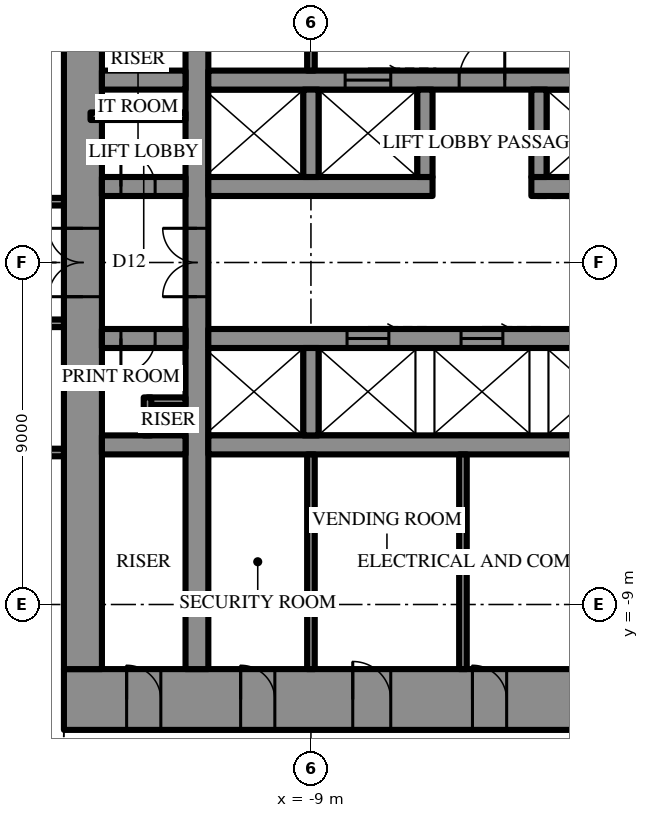
"""IFC4 building model, lengths in metres.
Left out: names, types, materials, properties, quantities, classifications, styles, units other than length and angle.
Written with IfcOpenShell. Run it as: python <this file> out.ifc"""

import sys

from ifc_helpers import new_model, si_unit, direction, frame, frame_2d, origin, place, context, subcontext, project, spatial, rectangle, extrude, element, fill, save


model = new_model("IFC4")
c1 = context("Model", 3, precision=1e-05, world=origin(), true_north=direction((0.0, 1.0)))
c2 = subcontext(c1, "Body", "Model", "MODEL_VIEW")
j1 = project(units=[si_unit("LENGTHUNIT", "METRE"), si_unit("PLANEANGLEUNIT", "RADIAN")], contexts=[c1])
p1 = place(None, origin())
s1 = spatial("IfcSite", under=j1, at=p1, CompositionType="ELEMENT")
p2 = place(p1, origin())
s2 = spatial("IfcBuilding", under=s1, at=p2, CompositionType="ELEMENT")
p3 = place(p2, frame((0.0, 0.0, 286.9)))
s3 = spatial("IfcBuildingStorey", under=s2, at=p3, CompositionType="ELEMENT", Elevation=286.9)
p4 = place(p3, frame((15.5, -11.5, 0.0), z_axis=(0.0, 0.0, 1.0), x_axis=(-1.0, 0.0, 0.0)))
e1 = element("IfcWall", 1, at=p4, inside=s3, PredefinedType="SHEAR", context=c2, shape_type="SweptSolid", body=[
    extrude(rectangle(XDim=31.0, YDim=1.6, at=frame_2d((15.5, 0.0))), origin(), (0.0, 0.0, 1.0), 4.2),
])
p5 = place(p4, frame((16.35, 0.0, 0.0)))
e2 = element("IfcOpeningElement", 2, at=p5, cuts=e1, PredefinedType="OPENING", context=c2, shape_type="SweptSolid", body=[
    extrude(rectangle(XDim=0.9, YDim=2.2, at=frame_2d((0.45, 1.1))), frame((0.0, 0.81, 0.0), z_axis=(0.0, -1.0, 0.0), x_axis=(1.0, 0.0, 0.0)), (0.0, 0.0, 1.0), 1.62),
])
p6 = place(p4, frame((19.35, 0.0, 0.0)))
e3 = element("IfcOpeningElement", 3, at=p6, cuts=e1, PredefinedType="OPENING", context=c2, shape_type="SweptSolid", body=[
    extrude(rectangle(XDim=0.9, YDim=2.2, at=frame_2d((0.45, 1.1))), frame((0.0, 0.81, 0.0), z_axis=(0.0, -1.0, 0.0), x_axis=(1.0, 0.0, 0.0)), (0.0, 0.0, 1.0), 1.62),
])
p7 = place(p4, frame((22.4, 0.0, 0.0)))
e4 = element("IfcOpeningElement", 4, at=p7, cuts=e1, PredefinedType="OPENING", context=c2, shape_type="SweptSolid", body=[
    extrude(rectangle(XDim=1.0, YDim=2.2, at=frame_2d((0.5, 1.1))), frame((0.0, 0.81, 0.0), z_axis=(0.0, -1.0, 0.0), x_axis=(1.0, 0.0, 0.0)), (0.0, 0.0, 1.0), 1.62),
])
p8 = place(p4, frame((1.65, 0.0, 0.0)))
e5 = element("IfcOpeningElement", 5, at=p8, cuts=e1, PredefinedType="OPENING", context=c2, shape_type="SweptSolid", body=[
    extrude(rectangle(XDim=0.9, YDim=2.2, at=frame_2d((0.45, 1.1))), frame((0.0, 0.81, 0.0), z_axis=(0.0, -1.0, 0.0), x_axis=(1.0, 0.0, 0.0)), (0.0, 0.0, 1.0), 1.62),
])
p9 = place(p4, frame((4.65, 0.0, 0.0)))
e6 = element("IfcOpeningElement", 6, at=p9, cuts=e1, PredefinedType="OPENING", context=c2, shape_type="SweptSolid", body=[
    extrude(rectangle(XDim=0.9, YDim=2.2, at=frame_2d((0.45, 1.1))), frame((0.0, 0.81, 0.0), z_axis=(0.0, -1.0, 0.0), x_axis=(1.0, 0.0, 0.0)), (0.0, 0.0, 1.0), 1.62),
])
p10 = place(p4, frame((25.45, 0.0, 0.0)))
e7 = element("IfcOpeningElement", 7, at=p10, cuts=e1, PredefinedType="OPENING", context=c2, shape_type="SweptSolid", body=[
    extrude(rectangle(XDim=0.9, YDim=2.2, at=frame_2d((0.45, 1.1))), frame((0.0, 0.81, 0.0), z_axis=(0.0, -1.0, 0.0), x_axis=(1.0, 0.0, 0.0)), (0.0, 0.0, 1.0), 1.62),
])
p11 = place(p4, frame((28.45, 0.0, 0.0)))
e8 = element("IfcOpeningElement", 8, at=p11, cuts=e1, PredefinedType="OPENING", context=c2, shape_type="SweptSolid", body=[
    extrude(rectangle(XDim=0.9, YDim=2.2, at=frame_2d((0.45, 1.1))), frame((0.0, 0.81, 0.0), z_axis=(0.0, -1.0, 0.0), x_axis=(1.0, 0.0, 0.0)), (0.0, 0.0, 1.0), 1.62),
])
p12 = place(p3, frame((-15.0, 10.7, 0.0), z_axis=(0.0, 0.0, 1.0), x_axis=(0.0, -1.0, 0.0)))
e9 = element("IfcWall", 9, at=p12, inside=s3, PredefinedType="SHEAR", context=c2, shape_type="SweptSolid", body=[
    extrude(rectangle(XDim=21.4, YDim=1.0, at=frame_2d((10.7, 0.0))), origin(), (0.0, 0.0, 1.0), 4.2),
])
p13 = place(p12, frame((9.8, 0.0, 0.0)))
e10 = element("IfcOpeningElement", 10, at=p13, cuts=e9, PredefinedType="OPENING", context=c2, shape_type="SweptSolid", body=[
    extrude(rectangle(XDim=1.8, YDim=2.4, at=frame_2d((0.9, 1.2))), frame((0.0, 0.51, 0.0), z_axis=(0.0, -1.0, 0.0), x_axis=(1.0, 0.0, 0.0)), (0.0, 0.0, 1.0), 1.02),
])
p14 = place(p3, frame((-12.0, -10.7, 0.0), z_axis=(0.0, 0.0, 1.0), x_axis=(0.0, 1.0, 0.0)))
e11 = element("IfcWall", 11, at=p14, inside=s3, PredefinedType="SHEAR", context=c2, shape_type="SweptSolid", body=[
    extrude(rectangle(XDim=21.4, YDim=0.6, at=frame_2d((10.7, 0.0))), origin(), (0.0, 0.0, 1.0), 4.2),
])
p15 = place(p14, frame((9.8, 0.0, 0.0)))
e12 = element("IfcOpeningElement", 12, at=p15, cuts=e11, PredefinedType="OPENING", context=c2, shape_type="SweptSolid", body=[
    extrude(rectangle(XDim=1.8, YDim=2.4, at=frame_2d((0.9, 1.2))), frame((0.0, 0.31, 0.0), z_axis=(0.0, -1.0, 0.0), x_axis=(1.0, 0.0, 0.0)), (0.0, 0.0, 1.0), 0.62),
])
p16 = place(p3, frame((-14.5, 2.0, 0.0), z_axis=(0.0, 0.0, 1.0), x_axis=(1.0, 0.0, 0.0)))
e13 = element("IfcWall", 13, at=p16, inside=s3, PredefinedType="SHEAR", context=c2, shape_type="SweptSolid", body=[
    extrude(rectangle(XDim=2.2, YDim=0.5, at=frame_2d((1.1, 0.0))), origin(), (0.0, 0.0, 1.0), 4.2),
])
p17 = place(p16, frame((0.5, 0.0, 0.0)))
e14 = element("IfcOpeningElement", 14, at=p17, cuts=e13, PredefinedType="OPENING", context=c2, shape_type="SweptSolid", body=[
    extrude(rectangle(XDim=0.9, YDim=2.2, at=frame_2d((0.45, 1.1))), frame((0.0, 0.26, 0.0), z_axis=(0.0, -1.0, 0.0), x_axis=(1.0, 0.0, 0.0)), (0.0, 0.0, 1.0), 0.52),
])
p18 = place(p3, frame((-11.7, 2.0, 0.0), z_axis=(0.0, 0.0, 1.0), x_axis=(1.0, 0.0, 0.0)))
e15 = element("IfcWall", 15, at=p18, inside=s3, PredefinedType="SHEAR", context=c2, shape_type="SweptSolid", body=[
    extrude(rectangle(XDim=5.9, YDim=0.5, at=frame_2d((2.95, 0.0))), origin(), (0.0, 0.0, 1.0), 4.2),
])
p19 = place(p3, frame((-3.2, 2.0, 0.0), z_axis=(0.0, 0.0, 1.0), x_axis=(1.0, 0.0, 0.0)))
e16 = element("IfcWall", 16, at=p19, inside=s3, PredefinedType="SHEAR", context=c2, shape_type="SweptSolid", body=[
    extrude(rectangle(XDim=14.9, YDim=0.5, at=frame_2d((7.45, 0.0))), origin(), (0.0, 0.0, 1.0), 4.2),
])
p20 = place(p19, frame((1.15, 0.0, 0.0)))
e17 = element("IfcOpeningElement", 17, at=p20, cuts=e16, PredefinedType="OPENING", context=c2, shape_type="SweptSolid", body=[
    extrude(rectangle(XDim=1.1, YDim=2.2, at=frame_2d((0.55, 1.1))), frame((0.0, 0.26, 0.0), z_axis=(0.0, -1.0, 0.0), x_axis=(1.0, 0.0, 0.0)), (0.0, 0.0, 1.0), 0.52),
])
p21 = place(p19, frame((4.15, 0.0, 0.0)))
e18 = element("IfcOpeningElement", 18, at=p21, cuts=e16, PredefinedType="OPENING", context=c2, shape_type="SweptSolid", body=[
    extrude(rectangle(XDim=1.1, YDim=2.2, at=frame_2d((0.55, 1.1))), frame((0.0, 0.26, 0.0), z_axis=(0.0, -1.0, 0.0), x_axis=(1.0, 0.0, 0.0)), (0.0, 0.0, 1.0), 0.52),
])
p22 = place(p19, frame((7.15, 0.0, 0.0)))
e19 = element("IfcOpeningElement", 19, at=p22, cuts=e16, PredefinedType="OPENING", context=c2, shape_type="SweptSolid", body=[
    extrude(rectangle(XDim=1.1, YDim=2.2, at=frame_2d((0.55, 1.1))), frame((0.0, 0.26, 0.0), z_axis=(0.0, -1.0, 0.0), x_axis=(1.0, 0.0, 0.0)), (0.0, 0.0, 1.0), 0.52),
])
p23 = place(p19, frame((10.15, 0.0, 0.0)))
e20 = element("IfcOpeningElement", 20, at=p23, cuts=e16, PredefinedType="OPENING", context=c2, shape_type="SweptSolid", body=[
    extrude(rectangle(XDim=1.1, YDim=2.2, at=frame_2d((0.55, 1.1))), frame((0.0, 0.26, 0.0), z_axis=(0.0, -1.0, 0.0), x_axis=(1.0, 0.0, 0.0)), (0.0, 0.0, 1.0), 0.52),
])
p24 = place(p3, frame((-14.5, 4.8, 0.0), z_axis=(0.0, 0.0, 1.0), x_axis=(1.0, 0.0, 0.0)))
e21 = element("IfcWall", 21, at=p24, inside=s3, PredefinedType="SHEAR", context=c2, shape_type="SweptSolid", body=[
    extrude(rectangle(XDim=2.2, YDim=0.5, at=frame_2d((1.1, 0.0))), origin(), (0.0, 0.0, 1.0), 4.2),
])
p25 = place(p3, frame((-11.7, 4.8, 0.0), z_axis=(0.0, 0.0, 1.0), x_axis=(1.0, 0.0, 0.0)))
e22 = element("IfcWall", 22, at=p25, inside=s3, PredefinedType="SHEAR", context=c2, shape_type="SweptSolid", body=[
    extrude(rectangle(XDim=23.4, YDim=0.5, at=frame_2d((11.7, 0.0))), origin(), (0.0, 0.0, 1.0), 4.2),
])
p26 = place(p25, frame((6.6, 0.0, 0.0)))
e23 = element("IfcOpeningElement", 23, at=p26, cuts=e22, PredefinedType="OPENING", context=c2, shape_type="SweptSolid", body=[
    extrude(rectangle(XDim=1.2, YDim=2.2, at=frame_2d((0.6, 1.1))), frame((0.0, 0.26, 0.0), z_axis=(0.0, -1.0, 0.0), x_axis=(1.0, 0.0, 0.0)), (0.0, 0.0, 1.0), 0.52),
])
p27 = place(p25, frame((3.6, 0.0, 0.0)))
e24 = element("IfcOpeningElement", 24, at=p27, cuts=e22, PredefinedType="OPENING", context=c2, shape_type="SweptSolid", body=[
    extrude(rectangle(XDim=1.2, YDim=2.2, at=frame_2d((0.6, 1.1))), frame((0.0, 0.26, 0.0), z_axis=(0.0, -1.0, 0.0), x_axis=(1.0, 0.0, 0.0)), (0.0, 0.0, 1.0), 0.52),
])
for number, where, z_axis, x_axis in (
    (25, (-9.0, 2.25, 0.0), (0.0, 0.0, 1.0), (0.0, 1.0, 0.0)),
    (26, (-6.0, 2.25, 0.0), (0.0, 0.0, 1.0), (0.0, 1.0, 0.0)),
    (27, (-3.0, 2.25, 0.0), (0.0, 0.0, 1.0), (0.0, 1.0, 0.0)),
):
    element("IfcWall", number, at=place(p3, frame(where, z_axis=z_axis, x_axis=x_axis)), inside=s3, PredefinedType="SHEAR", context=c2, shape_type="SweptSolid", body=[
        extrude(rectangle(XDim=2.3, YDim=0.4, at=frame_2d((1.15, 0.0))), origin(), (0.0, 0.0, 1.0), 4.2),
    ])
p28 = place(p3, frame((3.2, -2.0, 0.0), z_axis=(0.0, 0.0, 1.0), x_axis=(-1.0, 0.0, 0.0)))
e28 = element("IfcWall", 28, at=p28, inside=s3, PredefinedType="SHEAR", context=c2, shape_type="SweptSolid", body=[
    extrude(rectangle(XDim=14.9, YDim=0.5, at=frame_2d((7.45, 0.0))), origin(), (0.0, 0.0, 1.0), 4.2),
])
p29 = place(p28, frame((1.15, 0.0, 0.0)))
e29 = element("IfcOpeningElement", 29, at=p29, cuts=e28, PredefinedType="OPENING", context=c2, shape_type="SweptSolid", body=[
    extrude(rectangle(XDim=1.1, YDim=2.2, at=frame_2d((0.55, 1.1))), frame((0.0, 0.26, 0.0), z_axis=(0.0, -1.0, 0.0), x_axis=(1.0, 0.0, 0.0)), (0.0, 0.0, 1.0), 0.52),
])
p30 = place(p28, frame((4.15, 0.0, 0.0)))
e30 = element("IfcOpeningElement", 30, at=p30, cuts=e28, PredefinedType="OPENING", context=c2, shape_type="SweptSolid", body=[
    extrude(rectangle(XDim=1.1, YDim=2.2, at=frame_2d((0.55, 1.1))), frame((0.0, 0.26, 0.0), z_axis=(0.0, -1.0, 0.0), x_axis=(1.0, 0.0, 0.0)), (0.0, 0.0, 1.0), 0.52),
])
p31 = place(p28, frame((7.15, 0.0, 0.0)))
e31 = element("IfcOpeningElement", 31, at=p31, cuts=e28, PredefinedType="OPENING", context=c2, shape_type="SweptSolid", body=[
    extrude(rectangle(XDim=1.1, YDim=2.2, at=frame_2d((0.55, 1.1))), frame((0.0, 0.26, 0.0), z_axis=(0.0, -1.0, 0.0), x_axis=(1.0, 0.0, 0.0)), (0.0, 0.0, 1.0), 0.52),
])
p32 = place(p28, frame((10.15, 0.0, 0.0)))
e32 = element("IfcOpeningElement", 32, at=p32, cuts=e28, PredefinedType="OPENING", context=c2, shape_type="SweptSolid", body=[
    extrude(rectangle(XDim=1.1, YDim=2.2, at=frame_2d((0.55, 1.1))), frame((0.0, 0.26, 0.0), z_axis=(0.0, -1.0, 0.0), x_axis=(1.0, 0.0, 0.0)), (0.0, 0.0, 1.0), 0.52),
])
p33 = place(p3, frame((-12.3, -2.0, 0.0), z_axis=(0.0, 0.0, 1.0), x_axis=(-1.0, 0.0, 0.0)))
e33 = element("IfcWall", 33, at=p33, inside=s3, PredefinedType="SHEAR", context=c2, shape_type="SweptSolid", body=[
    extrude(rectangle(XDim=2.2, YDim=0.5, at=frame_2d((1.1, 0.0))), origin(), (0.0, 0.0, 1.0), 4.2),
])
p34 = place(p33, frame((0.8, 0.0, 0.0)))
e34 = element("IfcOpeningElement", 34, at=p34, cuts=e33, PredefinedType="OPENING", context=c2, shape_type="SweptSolid", body=[
    extrude(rectangle(XDim=0.9, YDim=2.2, at=frame_2d((0.45, 1.1))), frame((0.0, 0.26, 0.0), z_axis=(0.0, -1.0, 0.0), x_axis=(1.0, 0.0, 0.0)), (0.0, 0.0, 1.0), 0.52),
])
p35 = place(p3, frame((11.7, -4.8, 0.0), z_axis=(0.0, 0.0, 1.0), x_axis=(-1.0, 0.0, 0.0)))
e35 = element("IfcWall", 35, at=p35, inside=s3, PredefinedType="SHEAR", context=c2, shape_type="SweptSolid", body=[
    extrude(rectangle(XDim=23.4, YDim=0.5, at=frame_2d((11.7, 0.0))), origin(), (0.0, 0.0, 1.0), 4.2),
])
p36 = place(p35, frame((6.6, 0.0, 0.0)))
e36 = element("IfcOpeningElement", 36, at=p36, cuts=e35, PredefinedType="OPENING", context=c2, shape_type="SweptSolid", body=[
    extrude(rectangle(XDim=1.2, YDim=2.2, at=frame_2d((0.6, 1.1))), frame((0.0, 0.26, 0.0), z_axis=(0.0, -1.0, 0.0), x_axis=(1.0, 0.0, 0.0)), (0.0, 0.0, 1.0), 0.52),
])
p37 = place(p35, frame((3.6, 0.0, 0.0)))
e37 = element("IfcOpeningElement", 37, at=p37, cuts=e35, PredefinedType="OPENING", context=c2, shape_type="SweptSolid", body=[
    extrude(rectangle(XDim=1.2, YDim=2.2, at=frame_2d((0.6, 1.1))), frame((0.0, 0.26, 0.0), z_axis=(0.0, -1.0, 0.0), x_axis=(1.0, 0.0, 0.0)), (0.0, 0.0, 1.0), 0.52),
])
p38 = place(p3, frame((-12.3, -4.8, 0.0), z_axis=(0.0, 0.0, 1.0), x_axis=(-1.0, 0.0, 0.0)))
e38 = element("IfcWall", 38, at=p38, inside=s3, PredefinedType="SHEAR", context=c2, shape_type="SweptSolid", body=[
    extrude(rectangle(XDim=2.2, YDim=0.5, at=frame_2d((1.1, 0.0))), origin(), (0.0, 0.0, 1.0), 4.2),
])
p39 = place(p3, frame((-9.0, -2.25, 0.0), z_axis=(0.0, 0.0, 1.0), x_axis=(0.0, -1.0, 0.0)))
e39 = element("IfcWall", 39, at=p39, inside=s3, PredefinedType="SHEAR", context=c2, shape_type="SweptSolid", body=[
    extrude(rectangle(XDim=2.3, YDim=0.4, at=frame_2d((1.15, 0.0))), origin(), (0.0, 0.0, 1.0), 4.2),
])
for number, where, z_axis, x_axis in (
    (40, (-9.0, 5.05, 0.0), (0.0, 0.0, 1.0), (0.0, 1.0, 0.0)),
    (41, (-9.0, -5.05, 0.0), (0.0, 0.0, 1.0), (0.0, -1.0, 0.0)),
    (42, (-5.0, -5.05, 0.0), (0.0, 0.0, 1.0), (0.0, -1.0, 0.0)),
):
    element("IfcWall", number, at=place(p3, frame(where, z_axis=z_axis, x_axis=x_axis)), inside=s3, PredefinedType="PARTITIONING", context=c2, shape_type="SweptSolid", body=[
        extrude(rectangle(XDim=5.65, YDim=0.2, at=frame_2d((2.825, 0.0))), origin(), (0.0, 0.0, 1.0), 4.0),
    ])
p40 = place(p3, frame((-14.8, 3.85, 0.0), z_axis=(0.0, 0.0, 1.0), x_axis=(1.0, 0.0, 0.0)))
e43 = element("IfcWall", 43, at=p40, inside=s3, PredefinedType="PARTITIONING", context=c2, shape_type="SweptSolid", body=[
    extrude(rectangle(XDim=2.5, YDim=0.2, at=frame_2d((1.25, 0.0))), origin(), (0.0, 0.0, 1.0), 4.0),
])
for number, where, z_axis, x_axis in (
    (44, (-12.3, -3.65, 0.0), (0.0, 0.0, 1.0), (-1.0, 0.0, 0.0)),
    (45, (-13.3, -3.55, 0.0), (0.0, 0.0, 1.0), (0.0, -1.0, 0.0)),
):
    element("IfcWall", number, at=place(p3, frame(where, z_axis=z_axis, x_axis=x_axis)), inside=s3, PredefinedType="PARTITIONING", context=c2, shape_type="SweptSolid", body=[
        extrude(rectangle(XDim=1.0, YDim=0.2, at=frame_2d((0.5, 0.0))), origin(), (0.0, 0.0, 1.0), 4.0),
    ])
p41 = place(p3, frame((-15.5, 1.6, 0.0), z_axis=(0.0, 0.0, 1.0), x_axis=(-1.0, 0.0, 0.0)))
e46 = element("IfcWall", 46, at=p41, inside=s3, PredefinedType="PARTITIONING", context=c2, shape_type="SweptSolid", body=[
    extrude(rectangle(XDim=9.7, YDim=0.2, at=frame_2d((4.85, 0.0))), origin(), (0.0, 0.0, 1.0), 4.0),
])
p42 = place(p41, frame((4.35, 0.0, 0.0)))
e47 = element("IfcOpeningElement", 47, at=p42, cuts=e46, PredefinedType="OPENING", context=c2, shape_type="SweptSolid", body=[
    extrude(rectangle(XDim=1.0, YDim=2.2, at=frame_2d((0.5, 1.1))), frame((0.0, 0.11, 0.0), z_axis=(0.0, -1.0, 0.0), x_axis=(1.0, 0.0, 0.0)), (0.0, 0.0, 1.0), 0.22),
])
p43 = place(p3, frame((-15.5, -1.6, 0.0), z_axis=(0.0, 0.0, 1.0), x_axis=(-1.0, 0.0, 0.0)))
e48 = element("IfcWall", 48, at=p43, inside=s3, PredefinedType="PARTITIONING", context=c2, shape_type="SweptSolid", body=[
    extrude(rectangle(XDim=9.7, YDim=0.2, at=frame_2d((4.85, 0.0))), origin(), (0.0, 0.0, 1.0), 4.0),
])
p44 = place(p43, frame((4.35, 0.0, 0.0)))
e49 = element("IfcOpeningElement", 49, at=p44, cuts=e48, PredefinedType="OPENING", context=c2, shape_type="SweptSolid", body=[
    extrude(rectangle(XDim=1.0, YDim=2.2, at=frame_2d((0.5, 1.1))), frame((0.0, 0.11, 0.0), z_axis=(0.0, -1.0, 0.0), x_axis=(1.0, 0.0, 0.0)), (0.0, 0.0, 1.0), 0.22),
])
p45 = place(p3, frame((-15.5, -5.0, 0.0), z_axis=(0.0, 0.0, 1.0), x_axis=(-1.0, 0.0, 0.0)))
e50 = element("IfcWall", 50, at=p45, inside=s3, PredefinedType="PARTITIONING", context=c2, shape_type="SweptSolid", body=[
    extrude(rectangle(XDim=14.845, YDim=0.2, at=frame_2d((7.423, 0.0))), origin(), (0.0, 0.0, 1.0), 4.0),
])
p46 = place(p45, frame((0.985, 0.0, 0.0)))
e51 = element("IfcOpeningElement", 51, at=p46, cuts=e50, PredefinedType="OPENING", context=c2, shape_type="SweptSolid", body=[
    extrude(rectangle(XDim=1.0, YDim=2.2, at=frame_2d((0.5, 1.1))), frame((0.0, 0.11, 0.0), z_axis=(0.0, -1.0, 0.0), x_axis=(1.0, 0.0, 0.0)), (0.0, 0.0, 1.0), 0.22),
])
p47 = place(p13, frame((1.8, 0.0, 0.0), z_axis=(0.0, 0.0, 1.0), x_axis=(-1.0, 0.0, 0.0)))
e52 = element("IfcDoor", 52, at=p47, inside=s3, OperationType="DOUBLE_DOOR_SINGLE_SWING", PredefinedType="DOOR", context=c2, shape_type="SweptSolid", body=[
    extrude(rectangle(XDim=1.8, YDim=2.4, at=frame_2d((0.9, 1.2))), frame((0.0, 0.025, 0.0), z_axis=(0.0, -1.0, 0.0), x_axis=(1.0, 0.0, 0.0)), (0.0, 0.0, 1.0), 0.05),
])
fill(e10, e52)
p48 = place(p26, origin())
e53 = element("IfcDoor", 53, at=p48, inside=s3, OperationType="SINGLE_SWING_LEFT", PredefinedType="DOOR", context=c2, shape_type="SweptSolid", body=[
    extrude(rectangle(XDim=1.2, YDim=2.2, at=frame_2d((0.6, 1.1))), frame((0.0, 0.025, 0.0), z_axis=(0.0, -1.0, 0.0), x_axis=(1.0, 0.0, 0.0)), (0.0, 0.0, 1.0), 0.05),
])
fill(e23, e53)
p49 = place(p6, frame((0.9, 0.0, 0.0), z_axis=(0.0, 0.0, 1.0), x_axis=(-1.0, 0.0, 0.0)))
e54 = element("IfcDoor", 54, at=p49, inside=s3, OperationType="SINGLE_SWING_RIGHT", PredefinedType="DOOR", context=c2, shape_type="SweptSolid", body=[
    extrude(rectangle(XDim=0.9, YDim=2.2, at=frame_2d((0.45, 1.1))), frame((0.0, 0.025, 0.0), z_axis=(0.0, -1.0, 0.0), x_axis=(1.0, 0.0, 0.0)), (0.0, 0.0, 1.0), 0.05),
])
fill(e3, e54)
p50 = place(p7, frame((1.0, 0.0, 0.0), z_axis=(0.0, 0.0, 1.0), x_axis=(-1.0, 0.0, 0.0)))
e55 = element("IfcDoor", 55, at=p50, inside=s3, OperationType="SINGLE_SWING_RIGHT", PredefinedType="DOOR", context=c2, shape_type="SweptSolid", body=[
    extrude(rectangle(XDim=1.0, YDim=2.2, at=frame_2d((0.5, 1.1))), frame((0.0, 0.025, 0.0), z_axis=(0.0, -1.0, 0.0), x_axis=(1.0, 0.0, 0.0)), (0.0, 0.0, 1.0), 0.05),
])
fill(e4, e55)
p51 = place(p10, frame((0.9, 0.0, 0.0), z_axis=(0.0, 0.0, 1.0), x_axis=(-1.0, 0.0, 0.0)))
e56 = element("IfcDoor", 56, at=p51, inside=s3, OperationType="SINGLE_SWING_RIGHT", PredefinedType="DOOR", context=c2, shape_type="SweptSolid", body=[
    extrude(rectangle(XDim=0.9, YDim=2.2, at=frame_2d((0.45, 1.1))), frame((0.0, 0.025, 0.0), z_axis=(0.0, -1.0, 0.0), x_axis=(1.0, 0.0, 0.0)), (0.0, 0.0, 1.0), 0.05),
])
fill(e7, e56)
p52 = place(p11, frame((0.9, 0.0, 0.0), z_axis=(0.0, 0.0, 1.0), x_axis=(-1.0, 0.0, 0.0)))
e57 = element("IfcDoor", 57, at=p52, inside=s3, OperationType="SINGLE_SWING_RIGHT", PredefinedType="DOOR", context=c2, shape_type="SweptSolid", body=[
    extrude(rectangle(XDim=0.9, YDim=2.2, at=frame_2d((0.45, 1.1))), frame((0.0, 0.025, 0.0), z_axis=(0.0, -1.0, 0.0), x_axis=(1.0, 0.0, 0.0)), (0.0, 0.0, 1.0), 0.05),
])
fill(e8, e57)
p53 = place(p17, origin())
e58 = element("IfcDoor", 58, at=p53, inside=s3, OperationType="SINGLE_SWING_RIGHT", PredefinedType="DOOR", context=c2, shape_type="SweptSolid", body=[
    extrude(rectangle(XDim=0.9, YDim=2.2, at=frame_2d((0.45, 1.1))), frame((0.0, 0.025, 0.0), z_axis=(0.0, -1.0, 0.0), x_axis=(1.0, 0.0, 0.0)), (0.0, 0.0, 1.0), 0.05),
])
fill(e14, e58)
p54 = place(p34, origin())
e59 = element("IfcDoor", 59, at=p54, inside=s3, OperationType="SINGLE_SWING_LEFT", PredefinedType="DOOR", context=c2, shape_type="SweptSolid", body=[
    extrude(rectangle(XDim=0.9, YDim=2.2, at=frame_2d((0.45, 1.1))), frame((0.0, 0.025, 0.0), z_axis=(0.0, -1.0, 0.0), x_axis=(1.0, 0.0, 0.0)), (0.0, 0.0, 1.0), 0.05),
])
fill(e34, e59)
p55 = place(p15, origin())
e60 = element("IfcDoor", 60, at=p55, inside=s3, OperationType="DOUBLE_DOOR_SINGLE_SWING", PredefinedType="DOOR", context=c2, shape_type="SweptSolid", body=[
    extrude(rectangle(XDim=1.8, YDim=2.4, at=frame_2d((0.9, 1.2))), frame((0.0, 0.025, 0.0), z_axis=(0.0, -1.0, 0.0), x_axis=(1.0, 0.0, 0.0)), (0.0, 0.0, 1.0), 0.05),
])
fill(e12, e60)
p56 = place(p27, origin())
e61 = element("IfcDoor", 61, at=p56, inside=s3, OperationType="SLIDING_TO_LEFT", PredefinedType="DOOR", context=c2, shape_type="SweptSolid", body=[
    extrude(rectangle(XDim=1.2, YDim=2.2, at=frame_2d((0.6, 1.1))), frame((0.0, 0.025, 0.0), z_axis=(0.0, -1.0, 0.0), x_axis=(1.0, 0.0, 0.0)), (0.0, 0.0, 1.0), 0.05),
])
fill(e24, e61)
p57 = place(p31, frame((1.1, 0.0, 0.0), z_axis=(0.0, 0.0, 1.0), x_axis=(-1.0, 0.0, 0.0)))
e62 = element("IfcDoor", 62, at=p57, inside=s3, OperationType="SLIDING_TO_LEFT", PredefinedType="DOOR", context=c2, shape_type="SweptSolid", body=[
    extrude(rectangle(XDim=1.1, YDim=2.2, at=frame_2d((0.55, 1.1))), frame((0.0, 0.025, 0.0), z_axis=(0.0, -1.0, 0.0), x_axis=(1.0, 0.0, 0.0)), (0.0, 0.0, 1.0), 0.05),
])
fill(e31, e62)
p58 = place(p32, frame((1.1, 0.0, 0.0), z_axis=(0.0, 0.0, 1.0), x_axis=(-1.0, 0.0, 0.0)))
e63 = element("IfcDoor", 63, at=p58, inside=s3, OperationType="SLIDING_TO_LEFT", PredefinedType="DOOR", context=c2, shape_type="SweptSolid", body=[
    extrude(rectangle(XDim=1.1, YDim=2.2, at=frame_2d((0.55, 1.1))), frame((0.0, 0.025, 0.0), z_axis=(0.0, -1.0, 0.0), x_axis=(1.0, 0.0, 0.0)), (0.0, 0.0, 1.0), 0.05),
])
fill(e32, e63)
save(model, sys.argv[1])
